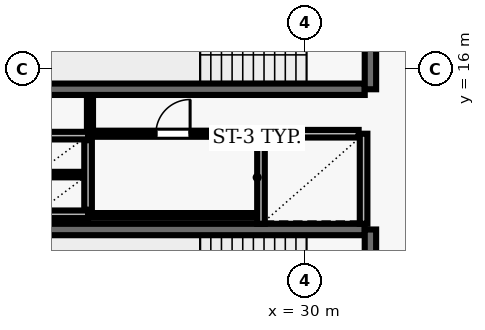
"""IFC4 building model, lengths in metres.
Left out: names, types, materials, properties, quantities, classifications, styles, units other than length and angle.
Written with IfcOpenShell. Run it as: python <this file> out.ifc"""

import sys

from ifc_helpers import new_model, si_unit, direction, frame, frame_2d, origin, place, context, subcontext, project, spatial, rectangle, extrude, element, fill, save


model = new_model("IFC4")
c1 = context("Model", 3, precision=1e-05, world=origin(), true_north=direction((0.0, 1.0)))
c2 = subcontext(c1, "Body", "Model", "MODEL_VIEW")
j1 = project(units=[si_unit("LENGTHUNIT", "METRE"), si_unit("PLANEANGLEUNIT", "RADIAN")], contexts=[c1])
p1 = place(None, origin())
s1 = spatial("IfcSite", under=j1, at=p1, CompositionType="ELEMENT")
p2 = place(p1, origin())
s2 = spatial("IfcBuilding", under=s1, at=p2, CompositionType="ELEMENT")
p3 = place(p2, frame((0.0, 0.0, 142.4)))
s3 = spatial("IfcBuildingStorey", under=s2, at=p3, CompositionType="ELEMENT", Elevation=142.4)
p4 = place(p3, frame((23.22, 15.47, 0.0), z_axis=(0.0, 0.0, 1.0), x_axis=(1.0, 0.0, 0.0)))
e1 = element("IfcWall", 1, at=p4, inside=s3, PredefinedType="SHEAR", context=c2, shape_type="SweptSolid", body=[
    extrude(rectangle(XDim=8.36, YDim=0.3, at=frame_2d((4.18, 0.0))), origin(), (0.0, 0.0, 1.0), 3.69),
])
p5 = place(p3, frame((31.73, 15.47, 0.0), z_axis=(0.0, 0.0, 1.0), x_axis=(0.0, 1.0, 0.0)))
e2 = element("IfcWall", 2, at=p5, inside=s3, PredefinedType="SHEAR", context=c2, shape_type="SweptSolid", body=[
    extrude(rectangle(XDim=3.51, YDim=0.3, at=frame_2d((1.755, 0.0))), origin(), (0.0, 0.0, 1.0), 3.69),
])
p6 = place(p5, frame((1.18, 0.0, 0.0)))
e3 = element("IfcOpeningElement", 3, at=p6, cuts=e2, PredefinedType="OPENING", context=c2, shape_type="SweptSolid", body=[
    extrude(rectangle(XDim=1.15, YDim=2.15, at=frame_2d((0.575, 1.075))), frame((0.0, 0.16, 0.0), z_axis=(0.0, -1.0, 0.0), x_axis=(1.0, 0.0, 0.0)), (0.0, 0.0, 1.0), 0.32),
])
p7 = place(p3, frame((31.58, 11.78, 0.0), z_axis=(0.0, 0.0, 1.0), x_axis=(-1.0, 0.0, 0.0)))
e4 = element("IfcWall", 4, at=p7, inside=s3, PredefinedType="SHEAR", context=c2, shape_type="SweptSolid", body=[
    extrude(rectangle(XDim=8.36, YDim=0.3, at=frame_2d((4.18, 0.0))), origin(), (0.0, 0.0, 1.0), 3.69),
])
p8 = place(p3, frame((31.73, 8.27, 0.0), z_axis=(0.0, 0.0, 1.0), x_axis=(0.0, 1.0, 0.0)))
e5 = element("IfcWall", 5, at=p8, inside=s3, PredefinedType="SHEAR", context=c2, shape_type="SweptSolid", body=[
    extrude(rectangle(XDim=3.51, YDim=0.3, at=frame_2d((1.755, 0.0))), origin(), (0.0, 0.0, 1.0), 3.69),
])
p9 = place(p8, frame((1.18, 0.0, 0.0)))
e6 = element("IfcOpeningElement", 6, at=p9, cuts=e5, PredefinedType="OPENING", context=c2, shape_type="SweptSolid", body=[
    extrude(rectangle(XDim=1.15, YDim=2.15, at=frame_2d((0.575, 1.075))), frame((0.0, 0.16, 0.0), z_axis=(0.0, -1.0, 0.0), x_axis=(1.0, 0.0, 0.0)), (0.0, 0.0, 1.0), 0.32),
])
for number, where, z_axis, x_axis in (
    (7, (28.85, 14.3, 0.0), (0.0, 0.0, 1.0), (0.0, -1.0, 0.0)),
    (8, (31.55, 11.93, 0.0), (0.0, 0.0, 1.0), (0.0, 1.0, 0.0)),
):
    element("IfcWall", number, at=place(p3, frame(where, z_axis=z_axis, x_axis=x_axis)), inside=s3, PredefinedType="SOLIDWALL", context=c2, shape_type="SweptSolid", body=[
        extrude(rectangle(XDim=2.37, YDim=0.2, at=frame_2d((1.185, 0.0))), origin(), (0.0, 0.0, 1.0), 3.69),
    ])
p10 = place(p3, frame((31.42, 14.3, 0.0), z_axis=(0.0, 0.0, 1.0), x_axis=(-1.0, 0.0, 0.0)))
e9 = element("IfcWall", 9, at=p10, inside=s3, PredefinedType="SOLIDWALL", context=c2, shape_type="SweptSolid", body=[
    extrude(rectangle(XDim=2.44, YDim=0.2, at=frame_2d((1.22, 0.0))), origin(), (0.0, 0.0, 1.0), 3.69),
])
for number, where, z_axis, x_axis in (
    (10, (22.9, 14.25, 0.0), (0.0, 0.0, 1.0), (1.0, 0.0, 0.0)),
    (11, (22.9, 12.18, 0.0), (0.0, 0.0, 1.0), (1.0, 0.0, 0.0)),
):
    element("IfcWall", number, at=place(p3, frame(where, z_axis=z_axis, x_axis=x_axis)), inside=s3, PredefinedType="SOLIDWALL", context=c2, shape_type="SweptSolid", body=[
        extrude(rectangle(XDim=1.4, YDim=0.2, at=frame_2d((0.7, 0.0))), origin(), (0.0, 0.0, 1.0), 3.69),
    ])
p11 = place(p3, frame((24.3, 12.3, 0.0), z_axis=(0.0, 0.0, 1.0), x_axis=(0.0, 1.0, 0.0)))
e12 = element("IfcWall", 12, at=p11, inside=s3, PredefinedType="SOLIDWALL", context=c2, shape_type="SweptSolid", body=[
    extrude(rectangle(XDim=1.83, YDim=0.2, at=frame_2d((0.915, 0.0))), origin(), (0.0, 0.0, 1.0), 3.69),
])
p12 = place(p3, frame((23.01, 13.225, 0.0), z_axis=(0.0, 0.0, 1.0), x_axis=(1.0, 0.0, 0.0)))
e13 = element("IfcWall", 13, at=p12, inside=s3, PredefinedType="PARTITIONING", context=c2, shape_type="SweptSolid", body=[
    extrude(rectangle(XDim=1.18, YDim=0.145, at=frame_2d((0.59, 0.0))), origin(), (0.0, 0.0, 1.0), 3.69),
])
p13 = place(p3, frame((24.35, 12.15, 0.0), z_axis=(0.0, 0.0, 1.0), x_axis=(1.0, 0.0, 0.0)))
e14 = element("IfcWall", 14, at=p13, inside=s3, PredefinedType="PARTITIONING", context=c2, shape_type="SweptSolid", body=[
    extrude(rectangle(XDim=4.37, YDim=0.125, at=frame_2d((2.185, 0.0))), origin(), (0.0, 0.0, 1.0), 3.69),
])
p14 = place(p3, frame((24.35, 14.3, 0.0), z_axis=(0.0, 0.0, 1.0), x_axis=(1.0, 0.0, 0.0)))
e15 = element("IfcWall", 15, at=p14, inside=s3, PredefinedType="PARTITIONING", context=c2, shape_type="SweptSolid", body=[
    extrude(rectangle(XDim=4.37, YDim=0.16, at=frame_2d((2.185, 0.0))), origin(), (0.0, 0.0, 1.0), 3.69),
])
p15 = place(p14, frame((1.735, 0.0, 0.0)))
e16 = element("IfcOpeningElement", 16, at=p15, cuts=e15, PredefinedType="OPENING", context=c2, shape_type="SweptSolid", body=[
    extrude(rectangle(XDim=0.9, YDim=2.1, at=frame_2d((0.45, 1.05))), frame((0.0, 0.09, 0.0), z_axis=(0.0, -1.0, 0.0), x_axis=(1.0, 0.0, 0.0)), (0.0, 0.0, 1.0), 0.18),
])
p16 = place(p3, frame((24.35, 15.29, 0.0), z_axis=(0.0, 0.0, 1.0), x_axis=(0.0, -1.0, 0.0)))
e17 = element("IfcWall", 17, at=p16, inside=s3, PredefinedType="PARTITIONING", context=c2, shape_type="SweptSolid", body=[
    extrude(rectangle(XDim=0.915, YDim=0.16, at=frame_2d((0.458, 0.0))), origin(), (0.0, 0.0, 1.0), 3.69),
])
p17 = place(p15, origin())
e18 = element("IfcDoor", 18, at=p17, inside=s3, OperationType="SINGLE_SWING_RIGHT", PredefinedType="DOOR", context=c2, shape_type="SweptSolid", body=[
    extrude(rectangle(XDim=0.9, YDim=2.1, at=frame_2d((0.45, 1.05))), frame((0.0, 0.025, 0.0), z_axis=(0.0, -1.0, 0.0), x_axis=(1.0, 0.0, 0.0)), (0.0, 0.0, 1.0), 0.05),
])
fill(e16, e18)
save(model, sys.argv[1])
